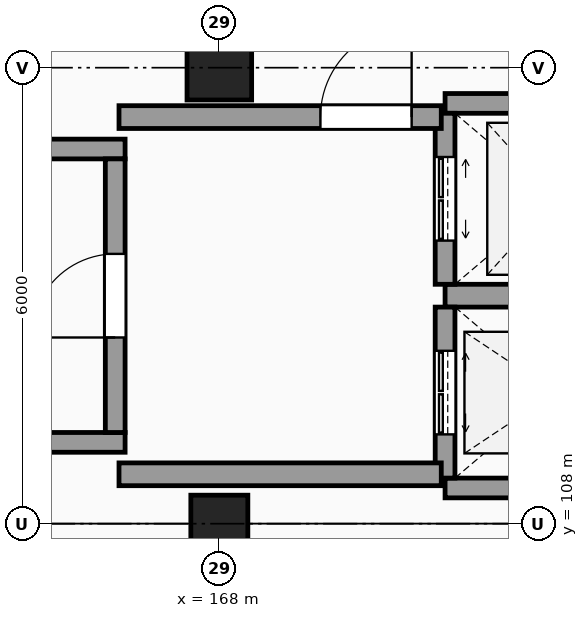
"""IFC4 building model, lengths in metres.
Left out: names, types, materials, properties, quantities, classifications, styles, units other than length and angle.
Written with IfcOpenShell. Run it as: python <this file> out.ifc"""

import sys

from ifc_helpers import new_model, si_unit, direction, frame, frame_2d, origin, origin_2d, place, context, subcontext, project, spatial, rectangle, circle, extrude, element, fill, save


model = new_model("IFC4")
c1 = context("Model", 3, precision=1e-05, world=origin(), true_north=direction((0.0, 1.0)))
c2 = subcontext(c1, "Body", "Model", "MODEL_VIEW")
j1 = project(units=[si_unit("LENGTHUNIT", "METRE"), si_unit("PLANEANGLEUNIT", "RADIAN")], contexts=[c1])
p1 = place(None, origin())
s1 = spatial("IfcSite", under=j1, at=p1, CompositionType="ELEMENT")
p2 = place(p1, origin())
s2 = spatial("IfcBuilding", under=s1, at=p2, CompositionType="ELEMENT")
p3 = place(p2, origin())
s3 = spatial("IfcBuildingStorey", under=s2, at=p3, CompositionType="ELEMENT", Elevation=0.0)
p4 = place(p3, frame((168.0, 108.0, 0.0), z_axis=(0.0, 0.0, 1.0), x_axis=(1.0, 0.0, 0.0)))
e1 = element("IfcColumn", 1, at=p4, inside=s3, PredefinedType="COLUMN", context=c2, shape_type="SweptSolid", body=[
    extrude(rectangle(XDim=0.75, YDim=0.75, at=origin_2d()), origin(), (0.0, 0.0, 1.0), 6.0),
])
p5 = place(p3, frame((168.0, 114.0, 0.0), z_axis=(0.0, 0.0, 1.0), x_axis=(1.0, 0.0, 0.0)))
e2 = element("IfcColumn", 2, at=p5, inside=s3, PredefinedType="COLUMN", context=c2, shape_type="SweptSolid", body=[
    extrude(circle(Radius=0.425, at=origin_2d()), origin(), (0.0, 0.0, 1.0), 6.0),
])
for number, where, z_axis, x_axis in (
    (3, (156.04, 109.07, 0.0), (0.0, 0.0, 1.0), (1.0, 0.0, 0.0)),
    (4, (156.04, 112.93, 0.0), (0.0, 0.0, 1.0), (1.0, 0.0, 0.0)),
):
    element("IfcWall", number, at=place(p3, frame(where, z_axis=z_axis, x_axis=x_axis)), inside=s3, PredefinedType="SHEAR", context=c2, shape_type="SweptSolid", body=[
        extrude(rectangle(XDim=10.72, YDim=0.26, at=frame_2d((5.36, 0.0))), origin(), (0.0, 0.0, 1.0), 6.0),
    ])
p6 = place(p3, frame((166.63, 109.2, 0.0), z_axis=(0.0, 0.0, 1.0), x_axis=(0.0, 1.0, 0.0)))
e5 = element("IfcWall", 5, at=p6, inside=s3, PredefinedType="SHEAR", context=c2, shape_type="SweptSolid", body=[
    extrude(rectangle(XDim=3.6, YDim=0.26, at=frame_2d((1.8, 0.0))), origin(), (0.0, 0.0, 1.0), 6.0),
])
p7 = place(p6, frame((1.25, 0.0, 0.0)))
e6 = element("IfcOpeningElement", 6, at=p7, cuts=e5, PredefinedType="OPENING", context=c2, shape_type="SweptSolid", body=[
    extrude(rectangle(XDim=1.1, YDim=2.15, at=frame_2d((0.55, 1.075))), frame((0.0, 0.14, 0.0), z_axis=(0.0, -1.0, 0.0), x_axis=(1.0, 0.0, 0.0)), (0.0, 0.0, 1.0), 0.28),
])
p8 = place(p3, frame((170.97, 108.47, 0.0), z_axis=(0.0, 0.0, 1.0), x_axis=(1.0, 0.0, 0.0)))
e7 = element("IfcWall", 7, at=p8, inside=s3, PredefinedType="SHEAR", context=c2, shape_type="SweptSolid", body=[
    extrude(rectangle(XDim=2.91, YDim=0.26, at=frame_2d((1.455, 0.0))), origin(), (0.0, 0.0, 1.0), 6.0),
])
p9 = place(p3, frame((170.97, 111.0, 0.0), z_axis=(0.0, 0.0, 1.0), x_axis=(1.0, 0.0, 0.0)))
e8 = element("IfcWall", 8, at=p9, inside=s3, PredefinedType="SHEAR", context=c2, shape_type="SweptSolid", body=[
    extrude(rectangle(XDim=2.91, YDim=0.3, at=frame_2d((1.455, 0.0))), origin(), (0.0, 0.0, 1.0), 6.0),
])
p10 = place(p3, frame((170.97, 108.6, 0.0), z_axis=(0.0, 0.0, 1.0), x_axis=(0.0, 1.0, 0.0)))
e9 = element("IfcWall", 9, at=p10, inside=s3, PredefinedType="SHEAR", context=c2, shape_type="SweptSolid", body=[
    extrude(rectangle(XDim=2.25, YDim=0.26, at=frame_2d((1.125, 0.0))), origin(), (0.0, 0.0, 1.0), 6.0),
])
p11 = place(p10, frame((0.575, 0.0, 0.0)))
e10 = element("IfcOpeningElement", 10, at=p11, cuts=e9, PredefinedType="OPENING", context=c2, shape_type="SweptSolid", body=[
    extrude(rectangle(XDim=1.1, YDim=2.2, at=frame_2d((0.55, 1.1))), frame((0.0, 0.14, 0.0), z_axis=(0.0, -1.0, 0.0), x_axis=(1.0, 0.0, 0.0)), (0.0, 0.0, 1.0), 0.28),
])
p12 = place(p3, frame((170.97, 113.53, 0.0), z_axis=(0.0, 0.0, 1.0), x_axis=(1.0, 0.0, 0.0)))
e11 = element("IfcWall", 11, at=p12, inside=s3, PredefinedType="SHEAR", context=c2, shape_type="SweptSolid", body=[
    extrude(rectangle(XDim=2.91, YDim=0.26, at=frame_2d((1.455, 0.0))), origin(), (0.0, 0.0, 1.0), 6.0),
])
p13 = place(p3, frame((170.97, 111.15, 0.0), z_axis=(0.0, 0.0, 1.0), x_axis=(0.0, 1.0, 0.0)))
e12 = element("IfcWall", 12, at=p13, inside=s3, PredefinedType="SHEAR", context=c2, shape_type="SweptSolid", body=[
    extrude(rectangle(XDim=2.25, YDim=0.26, at=frame_2d((1.125, 0.0))), origin(), (0.0, 0.0, 1.0), 6.0),
])
p14 = place(p13, frame((0.575, 0.0, 0.0)))
e13 = element("IfcOpeningElement", 13, at=p14, cuts=e12, PredefinedType="OPENING", context=c2, shape_type="SweptSolid", body=[
    extrude(rectangle(XDim=1.1, YDim=2.2, at=frame_2d((0.55, 1.1))), frame((0.0, 0.14, 0.0), z_axis=(0.0, -1.0, 0.0), x_axis=(1.0, 0.0, 0.0)), (0.0, 0.0, 1.0), 0.28),
])
p15 = place(p3, frame((166.68, 113.35, 0.0), z_axis=(0.0, 0.0, 1.0), x_axis=(1.0, 0.0, 0.0)))
e14 = element("IfcWall", 14, at=p15, inside=s3, PredefinedType="SHEAR", context=c2, shape_type="SweptSolid", body=[
    extrude(rectangle(XDim=4.24, YDim=0.3, at=frame_2d((2.12, 0.0))), origin(), (0.0, 0.0, 1.0), 6.0),
])
p16 = place(p15, frame((2.65, 0.0, 0.0)))
e15 = element("IfcOpeningElement", 15, at=p16, cuts=e14, PredefinedType="OPENING", context=c2, shape_type="SweptSolid", body=[
    extrude(rectangle(XDim=1.2, YDim=2.2, at=frame_2d((0.6, 1.1))), frame((0.0, 0.16, 0.0), z_axis=(0.0, -1.0, 0.0), x_axis=(1.0, 0.0, 0.0)), (0.0, 0.0, 1.0), 0.32),
])
p17 = place(p3, frame((166.68, 108.65, 0.0), z_axis=(0.0, 0.0, 1.0), x_axis=(1.0, 0.0, 0.0)))
e16 = element("IfcWall", 16, at=p17, inside=s3, PredefinedType="SHEAR", context=c2, shape_type="SweptSolid", body=[
    extrude(rectangle(XDim=4.24, YDim=0.3, at=frame_2d((2.12, 0.0))), origin(), (0.0, 0.0, 1.0), 6.0),
])
p18 = place(p7, origin())
e17 = element("IfcDoor", 17, at=p18, inside=s3, OperationType="SINGLE_SWING_LEFT", PredefinedType="DOOR", context=c2, shape_type="SweptSolid", body=[
    extrude(rectangle(XDim=1.1, YDim=2.15, at=frame_2d((0.55, 1.075))), frame((0.0, 0.025, 0.0), z_axis=(0.0, -1.0, 0.0), x_axis=(1.0, 0.0, 0.0)), (0.0, 0.0, 1.0), 0.05),
])
fill(e6, e17)
p19 = place(p11, origin())
e18 = element("IfcDoor", 18, at=p19, inside=s3, OperationType="DOUBLE_DOOR_SLIDING", PredefinedType="DOOR", context=c2, shape_type="SweptSolid", body=[
    extrude(rectangle(XDim=1.1, YDim=2.2, at=frame_2d((0.55, 1.1))), frame((0.0, 0.025, 0.0), z_axis=(0.0, -1.0, 0.0), x_axis=(1.0, 0.0, 0.0)), (0.0, 0.0, 1.0), 0.05),
])
fill(e10, e18)
p20 = place(p14, origin())
e19 = element("IfcDoor", 19, at=p20, inside=s3, OperationType="DOUBLE_DOOR_SLIDING", PredefinedType="DOOR", context=c2, shape_type="SweptSolid", body=[
    extrude(rectangle(XDim=1.1, YDim=2.2, at=frame_2d((0.55, 1.1))), frame((0.0, 0.025, 0.0), z_axis=(0.0, -1.0, 0.0), x_axis=(1.0, 0.0, 0.0)), (0.0, 0.0, 1.0), 0.05),
])
fill(e13, e19)
p21 = place(p16, origin())
e20 = element("IfcDoor", 20, at=p21, inside=s3, OperationType="SINGLE_SWING_RIGHT", PredefinedType="DOOR", context=c2, shape_type="SweptSolid", body=[
    extrude(rectangle(XDim=1.2, YDim=2.2, at=frame_2d((0.6, 1.1))), frame((0.0, 0.025, 0.0), z_axis=(0.0, -1.0, 0.0), x_axis=(1.0, 0.0, 0.0)), (0.0, 0.0, 1.0), 0.05),
])
fill(e15, e20)
save(model, sys.argv[1])
